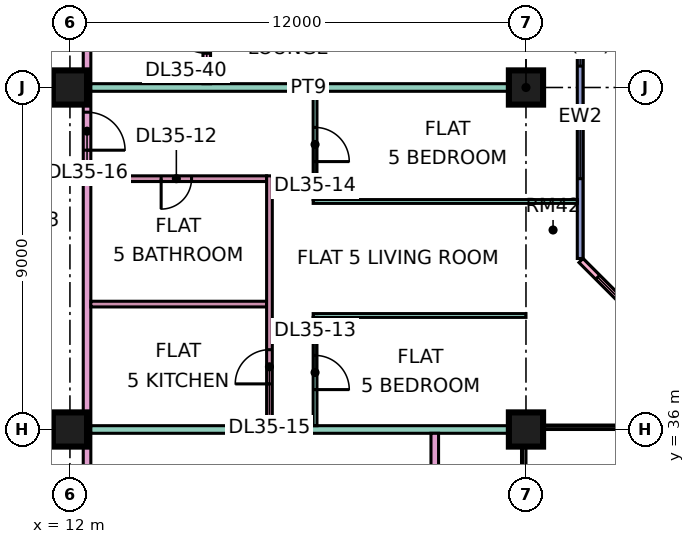
"""IFC4 building model, lengths in metres.
Left out: names, types, materials, properties, quantities, classifications, styles, units other than length and angle.
Written with IfcOpenShell. Run it as: python <this file> out.ifc"""

import sys

from ifc_helpers import new_model, si_unit, direction, frame, frame_2d, origin, origin_2d, place, context, subcontext, project, spatial, rectangle, extrude, element, fill, save


model = new_model("IFC4")
c1 = context("Model", 3, precision=1e-05, world=origin(), true_north=direction((0.0, 1.0)))
c2 = subcontext(c1, "Body", "Model", "MODEL_VIEW")
j1 = project(units=[si_unit("LENGTHUNIT", "METRE"), si_unit("PLANEANGLEUNIT", "RADIAN")], contexts=[c1])
p1 = place(None, origin())
s1 = spatial("IfcSite", under=j1, at=p1, CompositionType="ELEMENT")
p2 = place(p1, origin())
s2 = spatial("IfcBuilding", under=s1, at=p2, CompositionType="ELEMENT")
p3 = place(p2, frame((0.0, 0.0, 157.4)))
s3 = spatial("IfcBuildingStorey", under=s2, at=p3, CompositionType="ELEMENT", Elevation=157.4)
for number, where, z_axis, x_axis in (
    (1, (12.0, 36.0, 0.0), (0.0, 0.0, 1.0), (1.0, 0.0, 0.0)),
    (2, (12.0, 45.0, 0.0), (0.0, 0.0, 1.0), (1.0, 0.0, 0.0)),
    (3, (24.0, 36.0, 0.0), (0.0, 0.0, 1.0), (1.0, 0.0, 0.0)),
    (4, (24.0, 45.0, 0.0), (0.0, 0.0, 1.0), (1.0, 0.0, 0.0)),
):
    element("IfcColumn", number, at=place(p3, frame(where, z_axis=z_axis, x_axis=x_axis)), inside=s3, PredefinedType="COLUMN", context=c2, shape_type="SweptSolid", body=[
        extrude(rectangle(XDim=0.9, YDim=0.9, at=origin_2d()), origin(), (0.0, 0.0, 1.0), 3.75),
    ])
p4 = place(p3, frame((28.447, 37.447, 0.0), z_axis=(0.0, 0.0, 1.0), x_axis=(-0.707106781187, 0.707106781187, 0.0)))
e5 = element("IfcWall", 5, at=p4, inside=s3, PredefinedType="SOLIDWALL", context=c2, shape_type="SweptSolid", body=[
    extrude(rectangle(XDim=4.243, YDim=0.15, at=frame_2d((2.121, 0.0))), origin(), (0.0, 0.0, 1.0), 3.35),
])
p5 = place(p4, frame((0.621, 0.0, 0.45)))
e6 = element("IfcOpeningElement", 6, at=p5, cuts=e5, PredefinedType="OPENING", context=c2, shape_type="SweptSolid", body=[
    extrude(rectangle(XDim=3.0, YDim=2.4, at=frame_2d((1.5, 1.2))), frame((0.0, 0.085, 0.0), z_axis=(0.0, -1.0, 0.0), x_axis=(1.0, 0.0, 0.0)), (0.0, 0.0, 1.0), 0.17),
])
p6 = place(p3, frame((25.425, 40.5, 0.0), z_axis=(0.0, 0.0, 1.0), x_axis=(0.0, 1.0, 0.0)))
e7 = element("IfcWall", 7, at=p6, inside=s3, PredefinedType="SOLIDWALL", context=c2, shape_type="SweptSolid", body=[
    extrude(rectangle(XDim=7.425, YDim=0.15, at=frame_2d((3.712, 0.0))), origin(), (0.0, 0.0, 1.0), 3.35),
])
p7 = place(p6, frame((2.1, 0.0, 0.45)))
e8 = element("IfcOpeningElement", 8, at=p7, cuts=e7, PredefinedType="OPENING", context=c2, shape_type="SweptSolid", body=[
    extrude(rectangle(XDim=1.8, YDim=2.4, at=frame_2d((0.9, 1.2))), frame((0.0, 0.085, 0.0), z_axis=(0.0, -1.0, 0.0), x_axis=(1.0, 0.0, 0.0)), (0.0, 0.0, 1.0), 0.17),
])
p8 = place(p6, frame((5.062, 0.0, 0.45)))
e9 = element("IfcOpeningElement", 9, at=p8, cuts=e7, PredefinedType="OPENING", context=c2, shape_type="SweptSolid", body=[
    extrude(rectangle(XDim=1.8, YDim=2.4, at=frame_2d((0.9, 1.2))), frame((0.0, 0.085, 0.0), z_axis=(0.0, -1.0, 0.0), x_axis=(1.0, 0.0, 0.0)), (0.0, 0.0, 1.0), 0.17),
])
p9 = place(p3, frame((12.45, 20.0, 0.0), z_axis=(0.0, 0.0, 1.0), x_axis=(0.0, 1.0, 0.0)))
e10 = element("IfcWall", 10, at=p9, inside=s3, PredefinedType="PARTITIONING", context=c2, shape_type="SweptSolid", body=[
    extrude(rectangle(XDim=43.0, YDim=0.2, at=frame_2d((21.5, 0.0))), origin(), (0.0, 0.0, 1.0), 3.35),
])
p10 = place(p9, frame((5.95, 0.0, 0.0)))
e11 = element("IfcOpeningElement", 11, at=p10, cuts=e10, PredefinedType="OPENING", context=c2, shape_type="SweptSolid", body=[
    extrude(rectangle(XDim=1.0, YDim=2.1, at=frame_2d((0.5, 1.05))), frame((0.0, 0.11, 0.0), z_axis=(0.0, -1.0, 0.0), x_axis=(1.0, 0.0, 0.0)), (0.0, 0.0, 1.0), 0.22),
])
p11 = place(p9, frame((12.0, 0.0, 0.0)))
e12 = element("IfcOpeningElement", 12, at=p11, cuts=e10, PredefinedType="OPENING", context=c2, shape_type="SweptSolid", body=[
    extrude(rectangle(XDim=1.0, YDim=2.1, at=frame_2d((0.5, 1.05))), frame((0.0, 0.11, 0.0), z_axis=(0.0, -1.0, 0.0), x_axis=(1.0, 0.0, 0.0)), (0.0, 0.0, 1.0), 0.22),
])
p12 = place(p9, frame((23.35, 0.0, 0.0)))
e13 = element("IfcOpeningElement", 13, at=p12, cuts=e10, PredefinedType="OPENING", context=c2, shape_type="SweptSolid", body=[
    extrude(rectangle(XDim=1.0, YDim=2.1, at=frame_2d((0.5, 1.05))), frame((0.0, 0.11, 0.0), z_axis=(0.0, -1.0, 0.0), x_axis=(1.0, 0.0, 0.0)), (0.0, 0.0, 1.0), 0.22),
])
p13 = place(p9, frame((35.2, 0.0, 0.0)))
e14 = element("IfcOpeningElement", 14, at=p13, cuts=e10, PredefinedType="OPENING", context=c2, shape_type="SweptSolid", body=[
    extrude(rectangle(XDim=1.0, YDim=2.1, at=frame_2d((0.5, 1.05))), frame((0.0, 0.11, 0.0), z_axis=(0.0, -1.0, 0.0), x_axis=(1.0, 0.0, 0.0)), (0.0, 0.0, 1.0), 0.22),
])
p14 = place(p9, frame((1.15, 0.0, 0.0)))
e15 = element("IfcOpeningElement", 15, at=p14, cuts=e10, PredefinedType="OPENING", context=c2, shape_type="SweptSolid", body=[
    extrude(rectangle(XDim=1.8, YDim=2.1, at=frame_2d((0.9, 1.05))), frame((0.0, 0.11, 0.0), z_axis=(0.0, -1.0, 0.0), x_axis=(1.0, 0.0, 0.0)), (0.0, 0.0, 1.0), 0.22),
])
p15 = place(p9, frame((28.6, 0.0, 0.0)))
e16 = element("IfcOpeningElement", 16, at=p15, cuts=e10, PredefinedType="OPENING", context=c2, shape_type="SweptSolid", body=[
    extrude(rectangle(XDim=1.8, YDim=2.1, at=frame_2d((0.9, 1.05))), frame((0.0, 0.11, 0.0), z_axis=(0.0, -1.0, 0.0), x_axis=(1.0, 0.0, 0.0)), (0.0, 0.0, 1.0), 0.22),
])
p16 = place(p3, frame((12.55, 36.0, 0.0), z_axis=(0.0, 0.0, 1.0), x_axis=(1.0, 0.0, 0.0)))
e17 = element("IfcWall", 17, at=p16, inside=s3, PredefinedType="PARTITIONING", context=c2, shape_type="SweptSolid", body=[
    extrude(rectangle(XDim=11.45, YDim=0.2, at=frame_2d((5.725, 0.0))), origin(), (0.0, 0.0, 1.0), 3.35),
])
p17 = place(p3, frame((12.55, 39.3, 0.0), z_axis=(0.0, 0.0, 1.0), x_axis=(1.0, 0.0, 0.0)))
e18 = element("IfcWall", 18, at=p17, inside=s3, PredefinedType="PARTITIONING", context=c2, shape_type="SweptSolid", body=[
    extrude(rectangle(XDim=4.625, YDim=0.15, at=frame_2d((2.312, 0.0))), origin(), (0.0, 0.0, 1.0), 3.35),
])
p18 = place(p3, frame((12.55, 42.6, 0.0), z_axis=(0.0, 0.0, 1.0), x_axis=(1.0, 0.0, 0.0)))
e19 = element("IfcWall", 19, at=p18, inside=s3, PredefinedType="PARTITIONING", context=c2, shape_type="SweptSolid", body=[
    extrude(rectangle(XDim=4.625, YDim=0.15, at=frame_2d((2.312, 0.0))), origin(), (0.0, 0.0, 1.0), 3.35),
])
p19 = place(p18, frame((1.85, 0.0, 0.0)))
e20 = element("IfcOpeningElement", 20, at=p19, cuts=e19, PredefinedType="OPENING", context=c2, shape_type="SweptSolid", body=[
    extrude(rectangle(XDim=0.8, YDim=2.1, at=frame_2d((0.4, 1.05))), frame((0.0, 0.085, 0.0), z_axis=(0.0, -1.0, 0.0), x_axis=(1.0, 0.0, 0.0)), (0.0, 0.0, 1.0), 0.17),
])
p20 = place(p3, frame((12.55, 45.0, 0.0), z_axis=(0.0, 0.0, 1.0), x_axis=(1.0, 0.0, 0.0)))
e21 = element("IfcWall", 21, at=p20, inside=s3, PredefinedType="PARTITIONING", context=c2, shape_type="SweptSolid", body=[
    extrude(rectangle(XDim=11.45, YDim=0.2, at=frame_2d((5.725, 0.0))), origin(), (0.0, 0.0, 1.0), 3.35),
])
p21 = place(p3, frame((15.6, 45.1, 0.0), z_axis=(0.0, 0.0, 1.0), x_axis=(0.0, 1.0, 0.0)))
e22 = element("IfcWall", 22, at=p21, inside=s3, PredefinedType="PARTITIONING", context=c2, shape_type="SweptSolid", body=[
    extrude(rectangle(XDim=2.675, YDim=0.2, at=frame_2d((1.337, 0.0))), origin(), (0.0, 0.0, 1.0), 3.35),
])
p22 = place(p21, frame((0.8, 0.0, 0.0)))
e23 = element("IfcOpeningElement", 23, at=p22, cuts=e22, PredefinedType="OPENING", context=c2, shape_type="SweptSolid", body=[
    extrude(rectangle(XDim=1.0, YDim=2.1, at=frame_2d((0.5, 1.05))), frame((0.0, 0.11, 0.0), z_axis=(0.0, -1.0, 0.0), x_axis=(1.0, 0.0, 0.0)), (0.0, 0.0, 1.0), 0.22),
])
p23 = place(p3, frame((17.25, 36.1, 0.0), z_axis=(0.0, 0.0, 1.0), x_axis=(0.0, 1.0, 0.0)))
e24 = element("IfcWall", 24, at=p23, inside=s3, PredefinedType="PARTITIONING", context=c2, shape_type="SweptSolid", body=[
    extrude(rectangle(XDim=6.575, YDim=0.15, at=frame_2d((3.288, 0.0))), origin(), (0.0, 0.0, 1.0), 3.35),
])
p24 = place(p23, frame((1.1, 0.0, 0.0)))
e25 = element("IfcOpeningElement", 25, at=p24, cuts=e24, PredefinedType="OPENING", context=c2, shape_type="SweptSolid", body=[
    extrude(rectangle(XDim=0.9, YDim=2.1, at=frame_2d((0.45, 1.05))), frame((0.0, 0.085, 0.0), z_axis=(0.0, -1.0, 0.0), x_axis=(1.0, 0.0, 0.0)), (0.0, 0.0, 1.0), 0.17),
])
p25 = place(p3, frame((18.4, 39.0, 0.0), z_axis=(0.0, 0.0, 1.0), x_axis=(1.0, 0.0, 0.0)))
e26 = element("IfcWall", 26, at=p25, inside=s3, PredefinedType="PARTITIONING", context=c2, shape_type="SweptSolid", body=[
    extrude(rectangle(XDim=5.6, YDim=0.1, at=frame_2d((2.8, 0.0))), origin(), (0.0, 0.0, 1.0), 3.35),
])
p26 = place(p3, frame((18.4, 42.0, 0.0), z_axis=(0.0, 0.0, 1.0), x_axis=(1.0, 0.0, 0.0)))
e27 = element("IfcWall", 27, at=p26, inside=s3, PredefinedType="PARTITIONING", context=c2, shape_type="SweptSolid", body=[
    extrude(rectangle(XDim=6.95, YDim=0.1, at=frame_2d((3.475, 0.0))), origin(), (0.0, 0.0, 1.0), 3.35),
])
p27 = place(p3, frame((18.45, 36.1, 0.0), z_axis=(0.0, 0.0, 1.0), x_axis=(0.0, 1.0, 0.0)))
e28 = element("IfcWall", 28, at=p27, inside=s3, PredefinedType="PARTITIONING", context=c2, shape_type="SweptSolid", body=[
    extrude(rectangle(XDim=2.85, YDim=0.1, at=frame_2d((1.425, 0.0))), origin(), (0.0, 0.0, 1.0), 3.35),
])
p28 = place(p27, frame((0.95, 0.0, 0.0)))
e29 = element("IfcOpeningElement", 29, at=p28, cuts=e28, PredefinedType="OPENING", context=c2, shape_type="SweptSolid", body=[
    extrude(rectangle(XDim=0.9, YDim=2.1, at=frame_2d((0.45, 1.05))), frame((0.0, 0.06, 0.0), z_axis=(0.0, -1.0, 0.0), x_axis=(1.0, 0.0, 0.0)), (0.0, 0.0, 1.0), 0.12),
])
p29 = place(p3, frame((18.45, 42.05, 0.0), z_axis=(0.0, 0.0, 1.0), x_axis=(0.0, 1.0, 0.0)))
e30 = element("IfcWall", 30, at=p29, inside=s3, PredefinedType="PARTITIONING", context=c2, shape_type="SweptSolid", body=[
    extrude(rectangle(XDim=2.85, YDim=0.1, at=frame_2d((1.425, 0.0))), origin(), (0.0, 0.0, 1.0), 3.35),
])
p30 = place(p29, frame((1.0, 0.0, 0.0)))
e31 = element("IfcOpeningElement", 31, at=p30, cuts=e30, PredefinedType="OPENING", context=c2, shape_type="SweptSolid", body=[
    extrude(rectangle(XDim=0.9, YDim=2.1, at=frame_2d((0.45, 1.05))), frame((0.0, 0.06, 0.0), z_axis=(0.0, -1.0, 0.0), x_axis=(1.0, 0.0, 0.0)), (0.0, 0.0, 1.0), 0.12),
])
p31 = place(p3, frame((21.6, 23.9, 0.0), z_axis=(0.0, 0.0, 1.0), x_axis=(0.0, 1.0, 0.0)))
e32 = element("IfcWall", 32, at=p31, inside=s3, PredefinedType="PARTITIONING", context=c2, shape_type="SweptSolid", body=[
    extrude(rectangle(XDim=12.0, YDim=0.2, at=frame_2d((6.0, 0.0))), origin(), (0.0, 0.0, 1.0), 3.35),
])
p32 = place(p5, origin())
e33 = element("IfcWindow", 33, at=p32, inside=s3, PartitioningType="SINGLE_PANEL", PredefinedType="WINDOW", context=c2, shape_type="SweptSolid", body=[
    extrude(rectangle(XDim=3.0, YDim=2.4, at=frame_2d((1.5, 1.2))), frame((0.0, 0.03, 0.0), z_axis=(0.0, -1.0, 0.0), x_axis=(1.0, 0.0, 0.0)), (0.0, 0.0, 1.0), 0.06),
])
fill(e6, e33)
p33 = place(p7, origin())
e34 = element("IfcWindow", 34, at=p33, inside=s3, PartitioningType="SINGLE_PANEL", PredefinedType="WINDOW", context=c2, shape_type="SweptSolid", body=[
    extrude(rectangle(XDim=1.8, YDim=2.4, at=frame_2d((0.9, 1.2))), frame((0.0, 0.03, 0.0), z_axis=(0.0, -1.0, 0.0), x_axis=(1.0, 0.0, 0.0)), (0.0, 0.0, 1.0), 0.06),
])
fill(e8, e34)
p34 = place(p8, origin())
e35 = element("IfcWindow", 35, at=p34, inside=s3, PartitioningType="SINGLE_PANEL", PredefinedType="WINDOW", context=c2, shape_type="SweptSolid", body=[
    extrude(rectangle(XDim=1.8, YDim=2.4, at=frame_2d((0.9, 1.2))), frame((0.0, 0.03, 0.0), z_axis=(0.0, -1.0, 0.0), x_axis=(1.0, 0.0, 0.0)), (0.0, 0.0, 1.0), 0.06),
])
fill(e9, e35)
p35 = place(p19, frame((0.8, 0.0, 0.0), z_axis=(0.0, 0.0, 1.0), x_axis=(-1.0, 0.0, 0.0)))
e36 = element("IfcDoor", 36, at=p35, inside=s3, OperationType="SINGLE_SWING_LEFT", PredefinedType="DOOR", context=c2, shape_type="SweptSolid", body=[
    extrude(rectangle(XDim=0.8, YDim=2.1, at=frame_2d((0.4, 1.05))), frame((0.0, 0.025, 0.0), z_axis=(0.0, -1.0, 0.0), x_axis=(1.0, 0.0, 0.0)), (0.0, 0.0, 1.0), 0.05),
])
fill(e20, e36)
p36 = place(p28, frame((0.9, 0.0, 0.0), z_axis=(0.0, 0.0, 1.0), x_axis=(-1.0, 0.0, 0.0)))
e37 = element("IfcDoor", 37, at=p36, inside=s3, OperationType="SINGLE_SWING_LEFT", PredefinedType="DOOR", context=c2, shape_type="SweptSolid", body=[
    extrude(rectangle(XDim=0.9, YDim=2.1, at=frame_2d((0.45, 1.05))), frame((0.0, 0.025, 0.0), z_axis=(0.0, -1.0, 0.0), x_axis=(1.0, 0.0, 0.0)), (0.0, 0.0, 1.0), 0.05),
])
fill(e29, e37)
p37 = place(p30, frame((0.9, 0.0, 0.0), z_axis=(0.0, 0.0, 1.0), x_axis=(-1.0, 0.0, 0.0)))
e38 = element("IfcDoor", 38, at=p37, inside=s3, OperationType="SINGLE_SWING_LEFT", PredefinedType="DOOR", context=c2, shape_type="SweptSolid", body=[
    extrude(rectangle(XDim=0.9, YDim=2.1, at=frame_2d((0.45, 1.05))), frame((0.0, 0.025, 0.0), z_axis=(0.0, -1.0, 0.0), x_axis=(1.0, 0.0, 0.0)), (0.0, 0.0, 1.0), 0.05),
])
fill(e31, e38)
p38 = place(p24, origin())
e39 = element("IfcDoor", 39, at=p38, inside=s3, OperationType="SINGLE_SWING_LEFT", PredefinedType="DOOR", context=c2, shape_type="SweptSolid", body=[
    extrude(rectangle(XDim=0.9, YDim=2.1, at=frame_2d((0.45, 1.05))), frame((0.0, 0.025, 0.0), z_axis=(0.0, -1.0, 0.0), x_axis=(1.0, 0.0, 0.0)), (0.0, 0.0, 1.0), 0.05),
])
fill(e25, e39)
p39 = place(p12, frame((1.0, 0.0, 0.0), z_axis=(0.0, 0.0, 1.0), x_axis=(-1.0, 0.0, 0.0)))
e40 = element("IfcDoor", 40, at=p39, inside=s3, OperationType="SINGLE_SWING_LEFT", PredefinedType="DOOR", context=c2, shape_type="SweptSolid", body=[
    extrude(rectangle(XDim=1.0, YDim=2.1, at=frame_2d((0.5, 1.05))), frame((0.0, 0.025, 0.0), z_axis=(0.0, -1.0, 0.0), x_axis=(1.0, 0.0, 0.0)), (0.0, 0.0, 1.0), 0.05),
])
fill(e13, e40)
p40 = place(p22, frame((1.0, 0.0, 0.0), z_axis=(0.0, 0.0, 1.0), x_axis=(-1.0, 0.0, 0.0)))
e41 = element("IfcDoor", 41, at=p40, inside=s3, OperationType="SINGLE_SWING_RIGHT", PredefinedType="DOOR", context=c2, shape_type="SweptSolid", body=[
    extrude(rectangle(XDim=1.0, YDim=2.1, at=frame_2d((0.5, 1.05))), frame((0.0, 0.025, 0.0), z_axis=(0.0, -1.0, 0.0), x_axis=(1.0, 0.0, 0.0)), (0.0, 0.0, 1.0), 0.05),
])
fill(e23, e41)
save(model, sys.argv[1])
